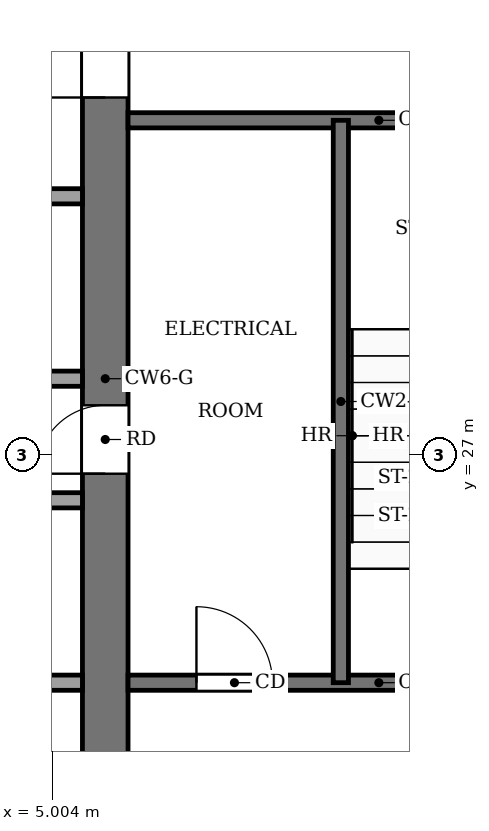
"""IFC4 building model, lengths in metres.
Left out: names, types, materials, properties, quantities, classifications, styles, units other than length and angle.
Written with IfcOpenShell. Run it as: python <this file> out.ifc"""

import sys

from ifc_helpers import new_model, si_unit, direction, frame, frame_2d, origin, place, context, subcontext, project, spatial, rectangle, extrude, element, fill, save


model = new_model("IFC4")
c1 = context("Model", 3, precision=1e-05, world=origin(), true_north=direction((0.0, 1.0)))
c2 = subcontext(c1, "Body", "Model", "MODEL_VIEW")
j1 = project(units=[si_unit("LENGTHUNIT", "METRE"), si_unit("PLANEANGLEUNIT", "RADIAN")], contexts=[c1])
p1 = place(None, origin())
s1 = spatial("IfcSite", under=j1, at=p1, CompositionType="ELEMENT")
p2 = place(p1, origin())
s2 = spatial("IfcBuilding", under=s1, at=p2, CompositionType="ELEMENT")
p3 = place(p2, frame((0.0, 0.0, 334.0)))
s3 = spatial("IfcBuildingStorey", under=s2, at=p3, CompositionType="ELEMENT", Elevation=334.0)
p4 = place(p3, frame((5.7, 18.4, -0.18), z_axis=(0.0, 0.0, 1.0), x_axis=(0.0, 1.0, 0.0)))
e1 = element("IfcWall", 1, at=p4, inside=s3, PredefinedType="SHEAR", context=c2, shape_type="SweptSolid", body=[
    extrude(rectangle(XDim=19.2, YDim=0.6, at=frame_2d((9.6, 0.0))), origin(), (0.0, 0.0, 1.0), 6.53),
])
p5 = place(p4, frame((8.35, 0.0, 0.18)))
e2 = element("IfcOpeningElement", 2, at=p5, cuts=e1, PredefinedType="OPENING", context=c2, shape_type="SweptSolid", body=[
    extrude(rectangle(XDim=0.9, YDim=2.1, at=frame_2d((0.45, 1.05))), frame((0.0, 0.31, 0.0), z_axis=(0.0, -1.0, 0.0), x_axis=(1.0, 0.0, 0.0)), (0.0, 0.0, 1.0), 0.62),
])
p6 = place(p4, frame((13.3, 0.0, 0.18)))
e3 = element("IfcOpeningElement", 3, at=p6, cuts=e1, PredefinedType="OPENING", context=c2, shape_type="SweptSolid", body=[
    extrude(rectangle(XDim=2.4, YDim=2.4, at=frame_2d((1.2, 1.2))), frame((0.0, 0.31, 0.0), z_axis=(0.0, -1.0, 0.0), x_axis=(1.0, 0.0, 0.0)), (0.0, 0.0, 1.0), 0.62),
])
p7 = place(p3, frame((-5.4, 24.0, 0.0), z_axis=(0.0, 0.0, 1.0), x_axis=(1.0, 0.0, 0.0)))
e4 = element("IfcWall", 4, at=p7, inside=s3, PredefinedType="PARTITIONING", context=c2, shape_type="SweptSolid", body=[
    extrude(rectangle(XDim=10.8, YDim=0.2, at=frame_2d((5.4, 0.0))), origin(), (0.0, 0.0, 1.0), 6.35),
])
p8 = place(p7, frame((3.064, 0.0, 0.0)))
e5 = element("IfcOpeningElement", 5, at=p8, cuts=e4, PredefinedType="OPENING", context=c2, shape_type="SweptSolid", body=[
    extrude(rectangle(XDim=1.0, YDim=2.1, at=frame_2d((0.5, 1.05))), frame((0.0, 0.11, 0.0), z_axis=(0.0, -1.0, 0.0), x_axis=(1.0, 0.0, 0.0)), (0.0, 0.0, 1.0), 0.22),
])
p9 = place(p7, frame((8.464, 0.0, 0.0)))
e6 = element("IfcOpeningElement", 6, at=p9, cuts=e4, PredefinedType="OPENING", context=c2, shape_type="SweptSolid", body=[
    extrude(rectangle(XDim=1.0, YDim=2.1, at=frame_2d((0.5, 1.05))), frame((0.0, 0.11, 0.0), z_axis=(0.0, -1.0, 0.0), x_axis=(1.0, 0.0, 0.0)), (0.0, 0.0, 1.0), 0.22),
])
p10 = place(p3, frame((6.0, 24.0, 0.0), z_axis=(0.0, 0.0, 1.0), x_axis=(1.0, 0.0, 0.0)))
e7 = element("IfcWall", 7, at=p10, inside=s3, PredefinedType="PARTITIONING", context=c2, shape_type="SweptSolid", body=[
    extrude(rectangle(XDim=6.6, YDim=0.2, at=frame_2d((3.3, 0.0))), origin(), (0.0, 0.0, 1.0), 6.35),
])
p11 = place(p10, frame((0.9, 0.0, 0.0)))
e8 = element("IfcOpeningElement", 8, at=p11, cuts=e7, PredefinedType="OPENING", context=c2, shape_type="SweptSolid", body=[
    extrude(rectangle(XDim=1.0, YDim=2.1, at=frame_2d((0.5, 1.05))), frame((0.0, 0.11, 0.0), z_axis=(0.0, -1.0, 0.0), x_axis=(1.0, 0.0, 0.0)), (0.0, 0.0, 1.0), 0.22),
])
p12 = place(p10, frame((4.4, 0.0, 0.0)))
e9 = element("IfcOpeningElement", 9, at=p12, cuts=e7, PredefinedType="OPENING", context=c2, shape_type="SweptSolid", body=[
    extrude(rectangle(XDim=1.2, YDim=2.2, at=frame_2d((0.6, 1.1))), frame((0.0, 0.11, 0.0), z_axis=(0.0, -1.0, 0.0), x_axis=(1.0, 0.0, 0.0)), (0.0, 0.0, 1.0), 0.22),
])
for number, where, z_axis, x_axis in (
    (10, (-5.4, 26.4, 0.0), (0.0, 0.0, 1.0), (1.0, 0.0, 0.0)),
    (11, (-5.4, 28.0, 0.0), (0.0, 0.0, 1.0), (1.0, 0.0, 0.0)),
):
    element("IfcWall", number, at=place(p3, frame(where, z_axis=z_axis, x_axis=x_axis)), inside=s3, PredefinedType="PARTITIONING", context=c2, shape_type="SweptSolid", body=[
        extrude(rectangle(XDim=10.8, YDim=0.2, at=frame_2d((5.4, 0.0))), origin(), (0.0, 0.0, 1.0), 6.35),
    ])
p13 = place(p3, frame((-5.4, 30.4, 0.0), z_axis=(0.0, 0.0, 1.0), x_axis=(1.0, 0.0, 0.0)))
e12 = element("IfcWall", 12, at=p13, inside=s3, PredefinedType="PARTITIONING", context=c2, shape_type="SweptSolid", body=[
    extrude(rectangle(XDim=10.8, YDim=0.2, at=frame_2d((5.4, 0.0))), origin(), (0.0, 0.0, 1.0), 6.35),
])
p14 = place(p13, frame((3.064, 0.0, 0.0)))
e13 = element("IfcOpeningElement", 13, at=p14, cuts=e12, PredefinedType="OPENING", context=c2, shape_type="SweptSolid", body=[
    extrude(rectangle(XDim=1.0, YDim=2.1, at=frame_2d((0.5, 1.05))), frame((0.0, 0.11, 0.0), z_axis=(0.0, -1.0, 0.0), x_axis=(1.0, 0.0, 0.0)), (0.0, 0.0, 1.0), 0.22),
])
p15 = place(p13, frame((8.464, 0.0, 0.0)))
e14 = element("IfcOpeningElement", 14, at=p15, cuts=e12, PredefinedType="OPENING", context=c2, shape_type="SweptSolid", body=[
    extrude(rectangle(XDim=1.0, YDim=2.1, at=frame_2d((0.5, 1.05))), frame((0.0, 0.11, 0.0), z_axis=(0.0, -1.0, 0.0), x_axis=(1.0, 0.0, 0.0)), (0.0, 0.0, 1.0), 0.22),
])
p16 = place(p3, frame((6.0, 31.4, 0.0), z_axis=(0.0, 0.0, 1.0), x_axis=(1.0, 0.0, 0.0)))
e15 = element("IfcWall", 15, at=p16, inside=s3, PredefinedType="PARTITIONING", context=c2, shape_type="SweptSolid", body=[
    extrude(rectangle(XDim=6.6, YDim=0.2, at=frame_2d((3.3, 0.0))), origin(), (0.0, 0.0, 1.0), 6.35),
])
p17 = place(p3, frame((8.8, 24.0, 0.0), z_axis=(0.0, 0.0, 1.0), x_axis=(0.0, 1.0, 0.0)))
e16 = element("IfcWall", 16, at=p17, inside=s3, PredefinedType="PARTITIONING", context=c2, shape_type="SweptSolid", body=[
    extrude(rectangle(XDim=7.4, YDim=0.2, at=frame_2d((3.7, 0.0))), origin(), (0.0, 0.0, 1.0), 6.35),
])
p18 = place(p11, origin())
e17 = element("IfcDoor", 17, at=p18, inside=s3, OperationType="SINGLE_SWING_RIGHT", PredefinedType="DOOR", context=c2, shape_type="SweptSolid", body=[
    extrude(rectangle(XDim=1.0, YDim=2.1, at=frame_2d((0.5, 1.05))), frame((0.0, 0.025, 0.0), z_axis=(0.0, -1.0, 0.0), x_axis=(1.0, 0.0, 0.0)), (0.0, 0.0, 1.0), 0.05),
])
fill(e8, e17)
p19 = place(p5, origin())
e18 = element("IfcDoor", 18, at=p19, inside=s3, OperationType="SINGLE_SWING_RIGHT", PredefinedType="DOOR", context=c2, shape_type="SweptSolid", body=[
    extrude(rectangle(XDim=0.9, YDim=2.1, at=frame_2d((0.45, 1.05))), frame((0.0, 0.025, 0.0), z_axis=(0.0, -1.0, 0.0), x_axis=(1.0, 0.0, 0.0)), (0.0, 0.0, 1.0), 0.05),
])
fill(e2, e18)
p20 = place(p6, origin())
e19 = element("IfcDoor", 19, at=p20, inside=s3, OperationType="DOUBLE_DOOR_SINGLE_SWING", PredefinedType="DOOR", context=c2, shape_type="SweptSolid", body=[
    extrude(rectangle(XDim=2.4, YDim=2.4, at=frame_2d((1.2, 1.2))), frame((0.0, 0.025, 0.0), z_axis=(0.0, -1.0, 0.0), x_axis=(1.0, 0.0, 0.0)), (0.0, 0.0, 1.0), 0.05),
])
fill(e3, e19)
save(model, sys.argv[1])
